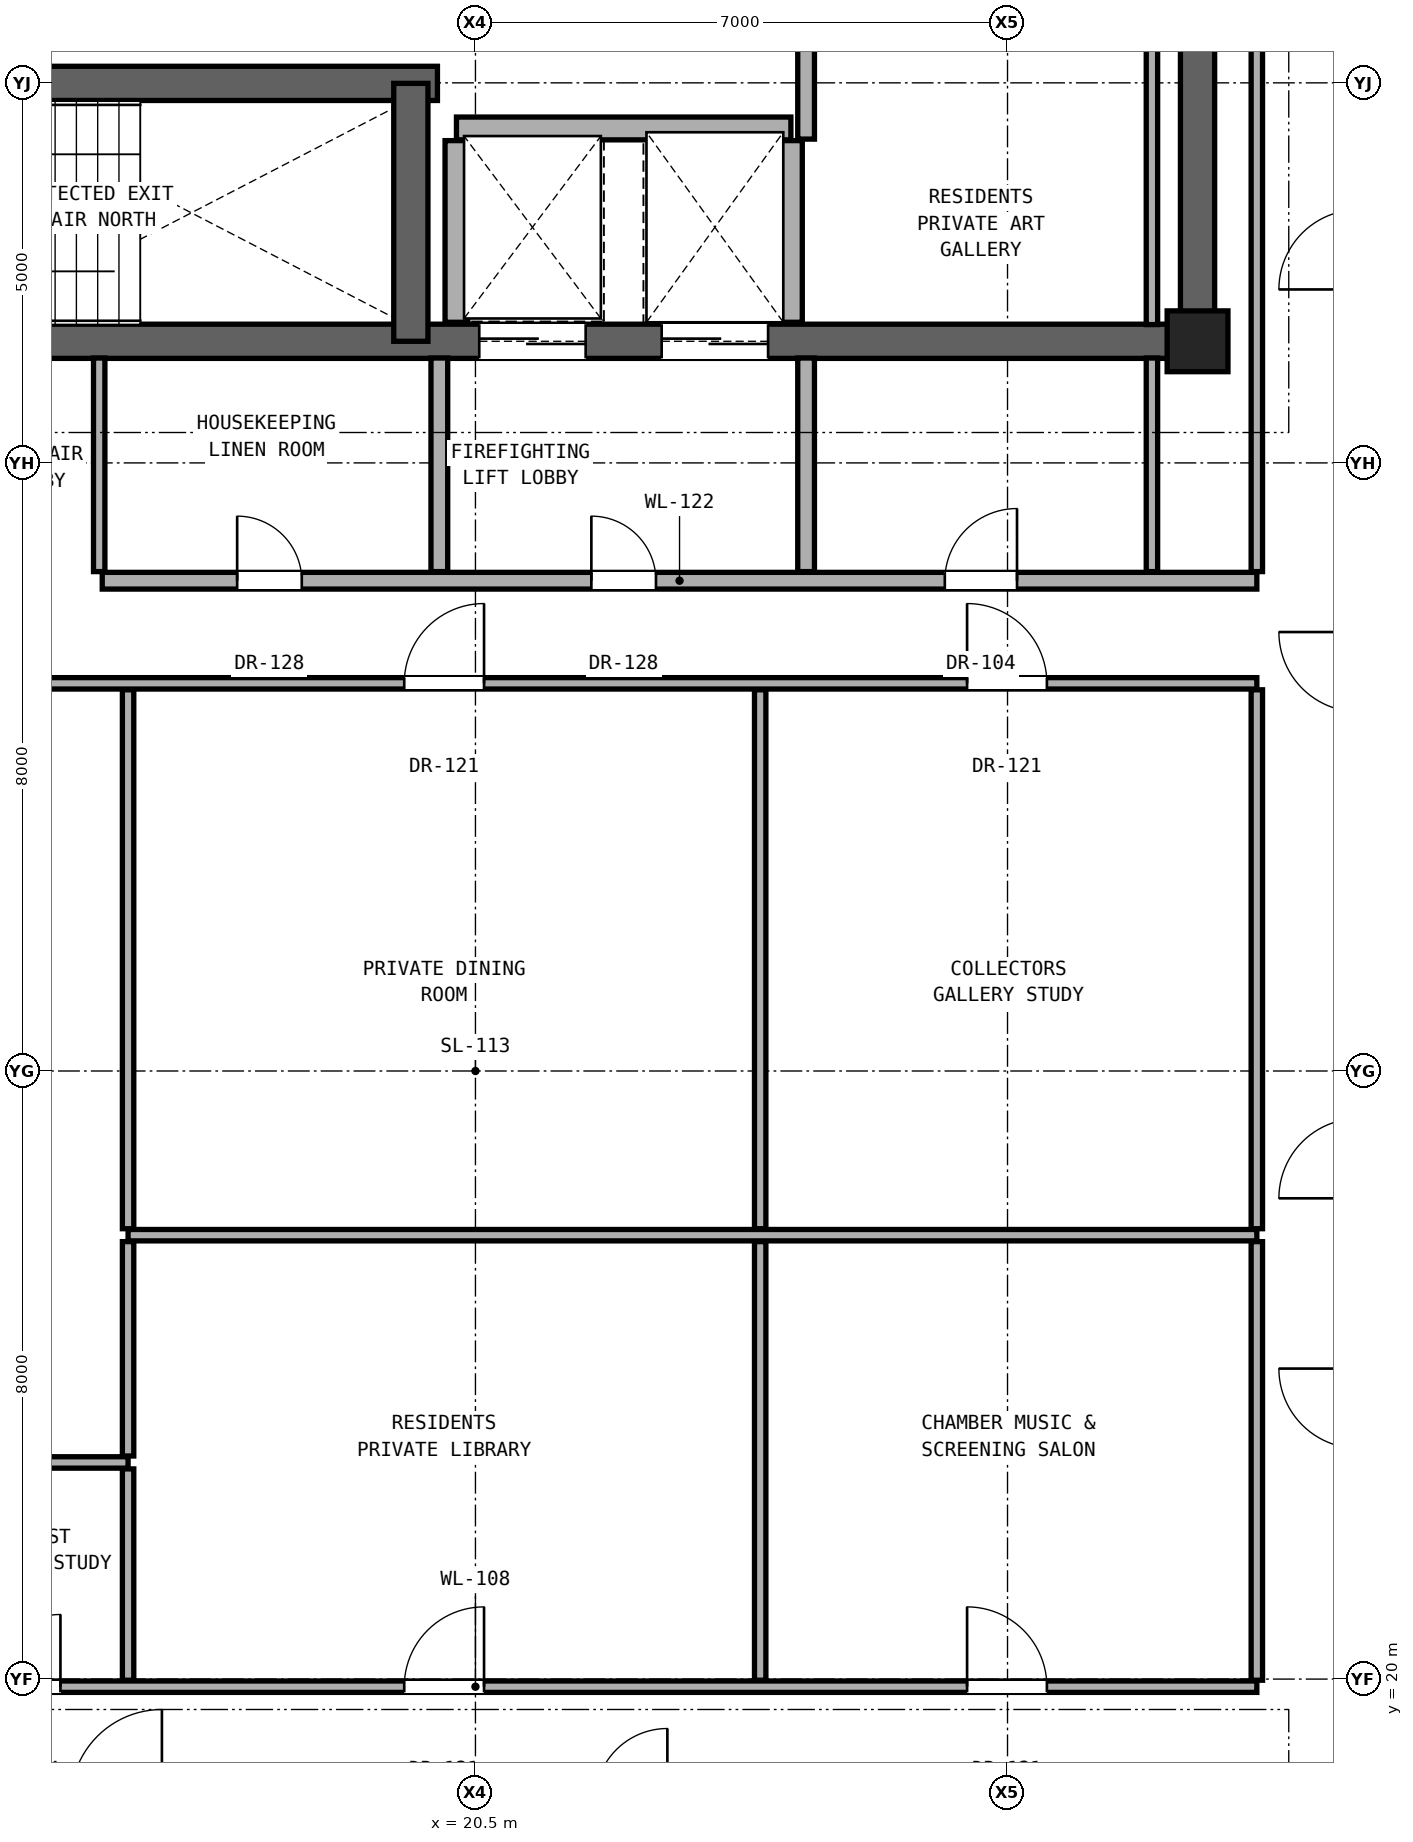
"""IFC4 building model, lengths in metres.
Left out: names, types, materials, properties, quantities, classifications, styles, units other than length and angle.
Written with IfcOpenShell. Run it as: python <this file> out.ifc"""

import sys

from ifc_helpers import new_model, si_unit, direction, frame, frame_2d, origin, origin_2d, place, context, subcontext, project, spatial, rectangle, extrude, element, fill, save


model = new_model("IFC4")
c1 = context("Model", 3, precision=1e-05, world=origin(), true_north=direction((0.0, 1.0)))
c2 = subcontext(c1, "Body", "Model", "MODEL_VIEW")
j1 = project(units=[si_unit("LENGTHUNIT", "METRE"), si_unit("PLANEANGLEUNIT", "RADIAN")], contexts=[c1])
p1 = place(None, origin())
s1 = spatial("IfcSite", under=j1, at=p1, CompositionType="ELEMENT")
p2 = place(p1, origin())
s2 = spatial("IfcBuilding", under=s1, at=p2, CompositionType="ELEMENT")
p3 = place(p2, frame((0.0, 0.0, 245.8)))
s3 = spatial("IfcBuildingStorey", under=s2, at=p3, CompositionType="ELEMENT", Elevation=245.8)
p4 = place(p3, frame((30.0, 37.6, 0.0), z_axis=(0.0, 0.0, 1.0), x_axis=(1.0, 0.0, 0.0)))
e1 = element("IfcColumn", 1, at=p4, inside=s3, PredefinedType="COLUMN", context=c2, shape_type="SweptSolid", body=[
    extrude(rectangle(XDim=0.8, YDim=0.8, at=origin_2d()), origin(), (0.0, 0.0, 1.0), 3.3),
])
p5 = place(p3, frame((30.0, 37.6, 0.0), z_axis=(0.0, 0.0, 1.0), x_axis=(0.0, 1.0, 0.0)))
e2 = element("IfcWall", 2, at=p5, inside=s3, PredefinedType="SHEAR", context=c2, shape_type="SweptSolid", body=[
    extrude(rectangle(XDim=6.0, YDim=0.45, at=frame_2d((3.0, 0.0))), origin(), (0.0, 0.0, 1.0), 3.1),
])
p6 = place(p3, frame((11.0, 37.6, 0.0), z_axis=(0.0, 0.0, 1.0), x_axis=(1.0, 0.0, 0.0)))
e3 = element("IfcWall", 3, at=p6, inside=s3, PredefinedType="SHEAR", context=c2, shape_type="SweptSolid", body=[
    extrude(rectangle(XDim=19.0, YDim=0.45, at=frame_2d((9.5, 0.0))), origin(), (0.0, 0.0, 1.0), 3.1),
])
p7 = place(p6, frame((1.06, 0.0, 0.0)))
e4 = element("IfcOpeningElement", 4, at=p7, cuts=e3, PredefinedType="OPENING", context=c2, shape_type="SweptSolid", body=[
    extrude(rectangle(XDim=1.15, YDim=2.2, at=frame_2d((0.575, 1.1))), frame((0.0, 0.235, 0.0), z_axis=(0.0, -1.0, 0.0), x_axis=(1.0, 0.0, 0.0)), (0.0, 0.0, 1.0), 0.47),
])
p8 = place(p6, frame((9.55, 0.0, 0.0)))
e5 = element("IfcOpeningElement", 5, at=p8, cuts=e3, PredefinedType="OPENING", context=c2, shape_type="SweptSolid", body=[
    extrude(rectangle(XDim=1.4, YDim=2.35, at=frame_2d((0.7, 1.175))), frame((0.0, 0.235, 0.0), z_axis=(0.0, -1.0, 0.0), x_axis=(1.0, 0.0, 0.0)), (0.0, 0.0, 1.0), 0.47),
])
p9 = place(p6, frame((11.95, 0.0, 0.0)))
e6 = element("IfcOpeningElement", 6, at=p9, cuts=e3, PredefinedType="OPENING", context=c2, shape_type="SweptSolid", body=[
    extrude(rectangle(XDim=1.4, YDim=2.35, at=frame_2d((0.7, 1.175))), frame((0.0, 0.235, 0.0), z_axis=(0.0, -1.0, 0.0), x_axis=(1.0, 0.0, 0.0)), (0.0, 0.0, 1.0), 0.47),
])
p10 = place(p3, frame((11.0, 40.993, 0.0), z_axis=(0.0, 0.0, 1.0), x_axis=(1.0, 0.0, 0.0)))
e7 = element("IfcWall", 7, at=p10, inside=s3, PredefinedType="SHEAR", context=c2, shape_type="SweptSolid", body=[
    extrude(rectangle(XDim=9.0, YDim=0.45, at=frame_2d((4.5, 0.0))), origin(), (0.0, 0.0, 1.0), 3.1),
])
p11 = place(p3, frame((19.65, 37.6, 0.0), z_axis=(0.0, 0.0, 1.0), x_axis=(0.0, 1.0, 0.0)))
e8 = element("IfcWall", 8, at=p11, inside=s3, PredefinedType="SHEAR", context=c2, shape_type="SweptSolid", body=[
    extrude(rectangle(XDim=3.393, YDim=0.45, at=frame_2d((1.696, 0.0))), origin(), (0.0, 0.0, 1.0), 3.1),
])
p12 = place(p3, frame((10.22, 19.9, 0.0), z_axis=(0.0, 0.0, 1.0), x_axis=(1.0, 0.0, 0.0)))
e9 = element("IfcWall", 9, at=p12, inside=s3, PredefinedType="PARTITIONING", context=c2, shape_type="SweptSolid", body=[
    extrude(rectangle(XDim=20.56, YDim=0.15, at=frame_2d((10.28, 0.0))), origin(), (0.0, 0.0, 1.0), 2.236),
])
p13 = place(p12, frame((1.36, 0.0, 0.0)))
e10 = element("IfcOpeningElement", 10, at=p13, cuts=e9, PredefinedType="OPENING", context=c2, shape_type="SweptSolid", body=[
    extrude(rectangle(XDim=0.9, YDim=2.1, at=frame_2d((0.45, 1.05))), frame((0.0, 0.085, 0.0), z_axis=(0.0, -1.0, 0.0), x_axis=(1.0, 0.0, 0.0)), (0.0, 0.0, 1.0), 0.17),
])
p14 = place(p12, frame((3.87, 0.0, 0.0)))
e11 = element("IfcOpeningElement", 11, at=p14, cuts=e9, PredefinedType="OPENING", context=c2, shape_type="SweptSolid", body=[
    extrude(rectangle(XDim=0.95, YDim=2.15, at=frame_2d((0.475, 1.075))), frame((0.0, 0.085, 0.0), z_axis=(0.0, -1.0, 0.0), x_axis=(1.0, 0.0, 0.0)), (0.0, 0.0, 1.0), 0.17),
])
p15 = place(p12, frame((9.343, 0.0, 0.0)))
e12 = element("IfcOpeningElement", 12, at=p15, cuts=e9, PredefinedType="OPENING", context=c2, shape_type="SweptSolid", body=[
    extrude(rectangle(XDim=1.05, YDim=2.2, at=frame_2d((0.525, 1.1))), frame((0.0, 0.085, 0.0), z_axis=(0.0, -1.0, 0.0), x_axis=(1.0, 0.0, 0.0)), (0.0, 0.0, 1.0), 0.17),
])
p16 = place(p12, frame((16.748, 0.0, 0.0)))
e13 = element("IfcOpeningElement", 13, at=p16, cuts=e9, PredefinedType="OPENING", context=c2, shape_type="SweptSolid", body=[
    extrude(rectangle(XDim=1.05, YDim=2.2, at=frame_2d((0.525, 1.1))), frame((0.0, 0.085, 0.0), z_axis=(0.0, -1.0, 0.0), x_axis=(1.0, 0.0, 0.0)), (0.0, 0.0, 1.0), 0.17),
])
p17 = place(p3, frame((10.22, 22.85, 0.0), z_axis=(0.0, 0.0, 1.0), x_axis=(1.0, 0.0, 0.0)))
e14 = element("IfcWall", 14, at=p17, inside=s3, PredefinedType="PARTITIONING", context=c2, shape_type="SweptSolid", body=[
    extrude(rectangle(XDim=5.71, YDim=0.15, at=frame_2d((2.855, 0.0))), origin(), (0.0, 0.0, 1.0), 2.236),
])
p18 = place(p3, frame((15.93, 25.84, 0.0), z_axis=(0.0, 0.0, 1.0), x_axis=(1.0, 0.0, 0.0)))
e15 = element("IfcWall", 15, at=p18, inside=s3, PredefinedType="PARTITIONING", context=c2, shape_type="SweptSolid", body=[
    extrude(rectangle(XDim=14.85, YDim=0.15, at=frame_2d((7.425, 0.0))), origin(), (0.0, 0.0, 1.0), 2.236),
])
p19 = place(p3, frame((10.22, 33.1, 0.0), z_axis=(0.0, 0.0, 1.0), x_axis=(1.0, 0.0, 0.0)))
e16 = element("IfcWall", 16, at=p19, inside=s3, PredefinedType="PARTITIONING", context=c2, shape_type="SweptSolid", body=[
    extrude(rectangle(XDim=20.56, YDim=0.15, at=frame_2d((10.28, 0.0))), origin(), (0.0, 0.0, 1.0), 2.236),
])
p20 = place(p19, frame((9.343, 0.0, 0.0)))
e17 = element("IfcOpeningElement", 17, at=p20, cuts=e16, PredefinedType="OPENING", context=c2, shape_type="SweptSolid", body=[
    extrude(rectangle(XDim=1.05, YDim=2.2, at=frame_2d((0.525, 1.1))), frame((0.0, 0.085, 0.0), z_axis=(0.0, -1.0, 0.0), x_axis=(1.0, 0.0, 0.0)), (0.0, 0.0, 1.0), 0.17),
])
p21 = place(p19, frame((16.748, 0.0, 0.0)))
e18 = element("IfcOpeningElement", 18, at=p21, cuts=e16, PredefinedType="OPENING", context=c2, shape_type="SweptSolid", body=[
    extrude(rectangle(XDim=1.05, YDim=2.2, at=frame_2d((0.525, 1.1))), frame((0.0, 0.085, 0.0), z_axis=(0.0, -1.0, 0.0), x_axis=(1.0, 0.0, 0.0)), (0.0, 0.0, 1.0), 0.17),
])
p22 = place(p3, frame((15.59, 34.45, 0.0), z_axis=(0.0, 0.0, 1.0), x_axis=(1.0, 0.0, 0.0)))
e19 = element("IfcWall", 19, at=p22, inside=s3, PredefinedType="SOLIDWALL", context=c2, shape_type="SweptSolid", body=[
    extrude(rectangle(XDim=15.19, YDim=0.22, at=frame_2d((7.595, 0.0))), origin(), (0.0, 0.0, 1.0), 2.236),
])
p23 = place(p22, frame((6.435, 0.0, 0.0)))
e20 = element("IfcOpeningElement", 20, at=p23, cuts=e19, PredefinedType="OPENING", context=c2, shape_type="SweptSolid", body=[
    extrude(rectangle(XDim=0.85, YDim=2.01, at=frame_2d((0.425, 1.005))), frame((0.0, 0.12, 0.0), z_axis=(0.0, -1.0, 0.0), x_axis=(1.0, 0.0, 0.0)), (0.0, 0.0, 1.0), 0.24),
])
p24 = place(p22, frame((11.085, 0.0, 0.0)))
e21 = element("IfcOpeningElement", 21, at=p24, cuts=e19, PredefinedType="OPENING", context=c2, shape_type="SweptSolid", body=[
    extrude(rectangle(XDim=0.95, YDim=2.15, at=frame_2d((0.475, 1.075))), frame((0.0, 0.12, 0.0), z_axis=(0.0, -1.0, 0.0), x_axis=(1.0, 0.0, 0.0)), (0.0, 0.0, 1.0), 0.24),
])
p25 = place(p22, frame((1.775, 0.0, 0.0)))
e22 = element("IfcOpeningElement", 22, at=p25, cuts=e19, PredefinedType="OPENING", context=c2, shape_type="SweptSolid", body=[
    extrude(rectangle(XDim=0.85, YDim=2.01, at=frame_2d((0.425, 1.005))), frame((0.0, 0.12, 0.0), z_axis=(0.0, -1.0, 0.0), x_axis=(1.0, 0.0, 0.0)), (0.0, 0.0, 1.0), 0.24),
])
p26 = place(p3, frame((20.25, 40.4, 0.0), z_axis=(0.0, 0.0, 1.0), x_axis=(1.0, 0.0, 0.0)))
e23 = element("IfcWall", 23, at=p26, inside=s3, PredefinedType="SOLIDWALL", context=c2, shape_type="SweptSolid", body=[
    extrude(rectangle(XDim=4.4, YDim=0.3, at=frame_2d((2.2, 0.0))), origin(), (0.0, 0.0, 1.0), 3.1),
])
p27 = place(p3, frame((15.55, 34.57, 0.0), z_axis=(0.0, 0.0, 1.0), x_axis=(0.0, 1.0, 0.0)))
e24 = element("IfcWall", 24, at=p27, inside=s3, PredefinedType="PARTITIONING", context=c2, shape_type="SweptSolid", body=[
    extrude(rectangle(XDim=2.81, YDim=0.15, at=frame_2d((1.405, 0.0))), origin(), (0.0, 0.0, 1.0), 3.1),
])
p28 = place(p3, frame((15.93, 19.985, 0.0), z_axis=(0.0, 0.0, 1.0), x_axis=(0.0, 1.0, 0.0)))
e25 = element("IfcWall", 25, at=p28, inside=s3, PredefinedType="PARTITIONING", context=c2, shape_type="SweptSolid", body=[
    extrude(rectangle(XDim=2.78, YDim=0.15, at=frame_2d((1.39, 0.0))), origin(), (0.0, 0.0, 1.0), 3.1),
])
p29 = place(p3, frame((15.93, 22.935, 0.0), z_axis=(0.0, 0.0, 1.0), x_axis=(0.0, 1.0, 0.0)))
e26 = element("IfcWall", 26, at=p29, inside=s3, PredefinedType="PARTITIONING", context=c2, shape_type="SweptSolid", body=[
    extrude(rectangle(XDim=2.82, YDim=0.15, at=frame_2d((1.41, 0.0))), origin(), (0.0, 0.0, 1.0), 2.236),
])
p30 = place(p3, frame((15.93, 25.925, 0.0), z_axis=(0.0, 0.0, 1.0), x_axis=(0.0, 1.0, 0.0)))
e27 = element("IfcWall", 27, at=p30, inside=s3, PredefinedType="PARTITIONING", context=c2, shape_type="SweptSolid", body=[
    extrude(rectangle(XDim=7.09, YDim=0.15, at=frame_2d((3.545, 0.0))), origin(), (0.0, 0.0, 1.0), 2.236),
])
p31 = place(p3, frame((20.025, 34.57, 0.0), z_axis=(0.0, 0.0, 1.0), x_axis=(0.0, 1.0, 0.0)))
e28 = element("IfcWall", 28, at=p31, inside=s3, PredefinedType="SOLIDWALL", context=c2, shape_type="SweptSolid", body=[
    extrude(rectangle(XDim=2.81, YDim=0.22, at=frame_2d((1.405, 0.0))), origin(), (0.0, 0.0, 1.0), 3.1),
])
p32 = place(p3, frame((20.25, 37.85, 0.0), z_axis=(0.0, 0.0, 1.0), x_axis=(0.0, 1.0, 0.0)))
e29 = element("IfcWall", 29, at=p32, inside=s3, PredefinedType="SOLIDWALL", context=c2, shape_type="SweptSolid", body=[
    extrude(rectangle(XDim=2.39, YDim=0.3, at=frame_2d((1.195, 0.0))), origin(), (0.0, 0.0, 1.0), 3.1),
])
p33 = place(p3, frame((24.246, 19.985, 0.0), z_axis=(0.0, 0.0, 1.0), x_axis=(0.0, 1.0, 0.0)))
e30 = element("IfcWall", 30, at=p33, inside=s3, PredefinedType="PARTITIONING", context=c2, shape_type="SweptSolid", body=[
    extrude(rectangle(XDim=5.77, YDim=0.15, at=frame_2d((2.885, 0.0))), origin(), (0.0, 0.0, 1.0), 2.236),
])
p34 = place(p3, frame((24.246, 25.925, 0.0), z_axis=(0.0, 0.0, 1.0), x_axis=(0.0, 1.0, 0.0)))
e31 = element("IfcWall", 31, at=p34, inside=s3, PredefinedType="PARTITIONING", context=c2, shape_type="SweptSolid", body=[
    extrude(rectangle(XDim=7.09, YDim=0.15, at=frame_2d((3.545, 0.0))), origin(), (0.0, 0.0, 1.0), 2.236),
])
p35 = place(p3, frame((24.65, 37.85, 0.0), z_axis=(0.0, 0.0, 1.0), x_axis=(0.0, 1.0, 0.0)))
e32 = element("IfcWall", 32, at=p35, inside=s3, PredefinedType="SOLIDWALL", context=c2, shape_type="SweptSolid", body=[
    extrude(rectangle(XDim=2.39, YDim=0.3, at=frame_2d((1.195, 0.0))), origin(), (0.0, 0.0, 1.0), 3.1),
])
p36 = place(p3, frame((24.85, 34.57, 0.0), z_axis=(0.0, 0.0, 1.0), x_axis=(0.0, 1.0, 0.0)))
e33 = element("IfcWall", 33, at=p36, inside=s3, PredefinedType="SOLIDWALL", context=c2, shape_type="SweptSolid", body=[
    extrude(rectangle(XDim=2.81, YDim=0.22, at=frame_2d((1.405, 0.0))), origin(), (0.0, 0.0, 1.0), 3.1),
])
p37 = place(p3, frame((24.85, 40.26, 0.0), z_axis=(0.0, 0.0, 1.0), x_axis=(0.0, 1.0, 0.0)))
e34 = element("IfcWall", 34, at=p37, inside=s3, PredefinedType="SOLIDWALL", context=c2, shape_type="SweptSolid", body=[
    extrude(rectangle(XDim=2.855, YDim=0.22, at=frame_2d((1.427, 0.0))), origin(), (0.0, 0.0, 1.0), 3.1),
])
p38 = place(p3, frame((29.4, 34.57, 0.0), z_axis=(0.0, 0.0, 1.0), x_axis=(0.0, 1.0, 0.0)))
e35 = element("IfcWall", 35, at=p38, inside=s3, PredefinedType="PARTITIONING", context=c2, shape_type="SweptSolid", body=[
    extrude(rectangle(XDim=2.81, YDim=0.15, at=frame_2d((1.405, 0.0))), origin(), (0.0, 0.0, 1.0), 3.1),
])
p39 = place(p3, frame((29.4, 37.82, 0.0), z_axis=(0.0, 0.0, 1.0), x_axis=(0.0, 1.0, 0.0)))
e36 = element("IfcWall", 36, at=p39, inside=s3, PredefinedType="PARTITIONING", context=c2, shape_type="SweptSolid", body=[
    extrude(rectangle(XDim=5.295, YDim=0.15, at=frame_2d((2.647, 0.0))), origin(), (0.0, 0.0, 1.0), 3.1),
])
p40 = place(p3, frame((30.78, 19.985, 0.0), z_axis=(0.0, 0.0, 1.0), x_axis=(0.0, 1.0, 0.0)))
e37 = element("IfcWall", 37, at=p40, inside=s3, PredefinedType="PARTITIONING", context=c2, shape_type="SweptSolid", body=[
    extrude(rectangle(XDim=5.77, YDim=0.15, at=frame_2d((2.885, 0.0))), origin(), (0.0, 0.0, 1.0), 2.396),
])
p41 = place(p3, frame((30.78, 25.925, 0.0), z_axis=(0.0, 0.0, 1.0), x_axis=(0.0, 1.0, 0.0)))
e38 = element("IfcWall", 38, at=p41, inside=s3, PredefinedType="PARTITIONING", context=c2, shape_type="SweptSolid", body=[
    extrude(rectangle(XDim=7.09, YDim=0.15, at=frame_2d((3.545, 0.0))), origin(), (0.0, 0.0, 1.0), 2.396),
])
p42 = place(p3, frame((30.78, 34.57, 0.0), z_axis=(0.0, 0.0, 1.0), x_axis=(0.0, 1.0, 0.0)))
e39 = element("IfcWall", 39, at=p42, inside=s3, PredefinedType="PARTITIONING", context=c2, shape_type="SweptSolid", body=[
    extrude(rectangle(XDim=9.095, YDim=0.15, at=frame_2d((4.547, 0.0))), origin(), (0.0, 0.0, 1.0), 2.492),
])
p43 = place(p23, origin())
e40 = element("IfcDoor", 40, at=p43, inside=s3, OperationType="SINGLE_SWING_LEFT", PredefinedType="DOOR", context=c2, shape_type="SweptSolid", body=[
    extrude(rectangle(XDim=0.85, YDim=2.01, at=frame_2d((0.425, 1.005))), frame((0.0, 0.025, 0.0), z_axis=(0.0, -1.0, 0.0), x_axis=(1.0, 0.0, 0.0)), (0.0, 0.0, 1.0), 0.05),
])
fill(e20, e40)
p44 = place(p24, origin())
e41 = element("IfcDoor", 41, at=p44, inside=s3, OperationType="SINGLE_SWING_RIGHT", PredefinedType="DOOR", context=c2, shape_type="SweptSolid", body=[
    extrude(rectangle(XDim=0.95, YDim=2.15, at=frame_2d((0.475, 1.075))), frame((0.0, 0.025, 0.0), z_axis=(0.0, -1.0, 0.0), x_axis=(1.0, 0.0, 0.0)), (0.0, 0.0, 1.0), 0.05),
])
fill(e21, e41)
p45 = place(p25, origin())
e42 = element("IfcDoor", 42, at=p45, inside=s3, OperationType="SINGLE_SWING_LEFT", PredefinedType="DOOR", context=c2, shape_type="SweptSolid", body=[
    extrude(rectangle(XDim=0.85, YDim=2.01, at=frame_2d((0.425, 1.005))), frame((0.0, 0.025, 0.0), z_axis=(0.0, -1.0, 0.0), x_axis=(1.0, 0.0, 0.0)), (0.0, 0.0, 1.0), 0.05),
])
fill(e22, e42)
p46 = place(p14, origin())
e43 = element("IfcDoor", 43, at=p46, inside=s3, OperationType="SINGLE_SWING_RIGHT", PredefinedType="DOOR", context=c2, shape_type="SweptSolid", body=[
    extrude(rectangle(XDim=0.95, YDim=2.15, at=frame_2d((0.475, 1.075))), frame((0.0, 0.025, 0.0), z_axis=(0.0, -1.0, 0.0), x_axis=(1.0, 0.0, 0.0)), (0.0, 0.0, 1.0), 0.05),
])
fill(e11, e43)
p47 = place(p15, origin())
e44 = element("IfcDoor", 44, at=p47, inside=s3, OperationType="SINGLE_SWING_RIGHT", PredefinedType="DOOR", context=c2, shape_type="SweptSolid", body=[
    extrude(rectangle(XDim=1.05, YDim=2.2, at=frame_2d((0.525, 1.1))), frame((0.0, 0.025, 0.0), z_axis=(0.0, -1.0, 0.0), x_axis=(1.0, 0.0, 0.0)), (0.0, 0.0, 1.0), 0.05),
])
fill(e12, e44)
p48 = place(p16, origin())
e45 = element("IfcDoor", 45, at=p48, inside=s3, OperationType="SINGLE_SWING_LEFT", PredefinedType="DOOR", context=c2, shape_type="SweptSolid", body=[
    extrude(rectangle(XDim=1.05, YDim=2.2, at=frame_2d((0.525, 1.1))), frame((0.0, 0.025, 0.0), z_axis=(0.0, -1.0, 0.0), x_axis=(1.0, 0.0, 0.0)), (0.0, 0.0, 1.0), 0.05),
])
fill(e13, e45)
p49 = place(p20, origin())
e46 = element("IfcDoor", 46, at=p49, inside=s3, OperationType="SINGLE_SWING_RIGHT", PredefinedType="DOOR", context=c2, shape_type="SweptSolid", body=[
    extrude(rectangle(XDim=1.05, YDim=2.2, at=frame_2d((0.525, 1.1))), frame((0.0, 0.025, 0.0), z_axis=(0.0, -1.0, 0.0), x_axis=(1.0, 0.0, 0.0)), (0.0, 0.0, 1.0), 0.05),
])
fill(e17, e46)
p50 = place(p21, origin())
e47 = element("IfcDoor", 47, at=p50, inside=s3, OperationType="SINGLE_SWING_LEFT", PredefinedType="DOOR", context=c2, shape_type="SweptSolid", body=[
    extrude(rectangle(XDim=1.05, YDim=2.2, at=frame_2d((0.525, 1.1))), frame((0.0, 0.025, 0.0), z_axis=(0.0, -1.0, 0.0), x_axis=(1.0, 0.0, 0.0)), (0.0, 0.0, 1.0), 0.05),
])
fill(e18, e47)
p51 = place(p8, origin())
e48 = element("IfcDoor", 48, at=p51, inside=s3, OperationType="DOUBLE_DOOR_SLIDING", PredefinedType="DOOR", context=c2, shape_type="SweptSolid", body=[
    extrude(rectangle(XDim=1.4, YDim=2.35, at=frame_2d((0.7, 1.175))), frame((0.0, 0.025, 0.0), z_axis=(0.0, -1.0, 0.0), x_axis=(1.0, 0.0, 0.0)), (0.0, 0.0, 1.0), 0.05),
])
fill(e5, e48)
p52 = place(p9, origin())
e49 = element("IfcDoor", 49, at=p52, inside=s3, OperationType="DOUBLE_DOOR_SLIDING", PredefinedType="DOOR", context=c2, shape_type="SweptSolid", body=[
    extrude(rectangle(XDim=1.4, YDim=2.35, at=frame_2d((0.7, 1.175))), frame((0.0, 0.025, 0.0), z_axis=(0.0, -1.0, 0.0), x_axis=(1.0, 0.0, 0.0)), (0.0, 0.0, 1.0), 0.05),
])
fill(e6, e49)
save(model, sys.argv[1])
